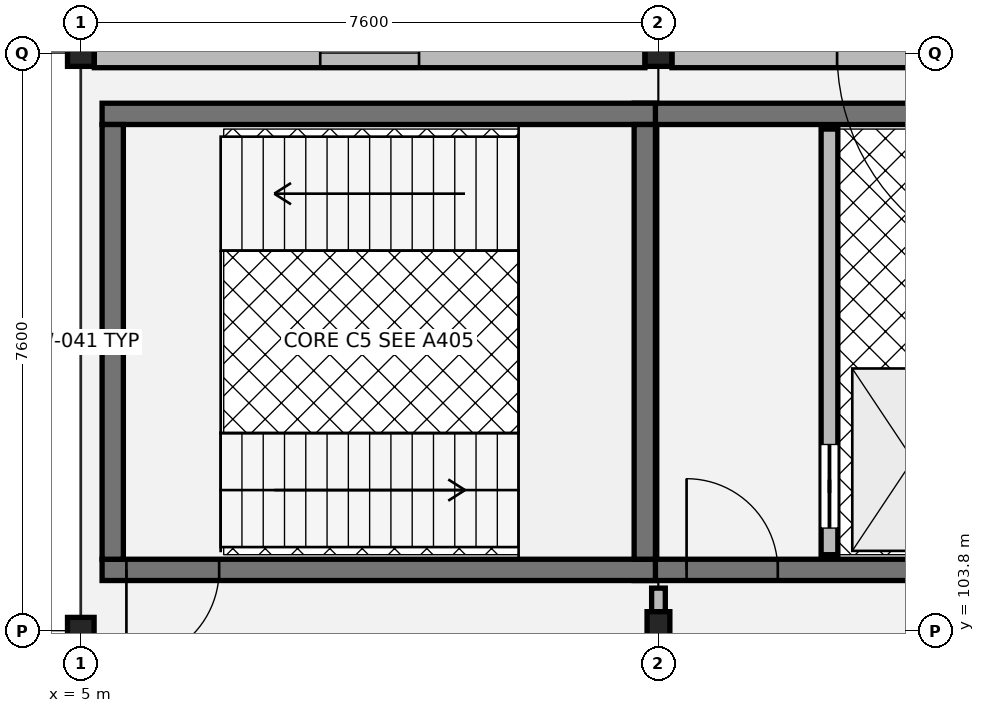
"""IFC4 building model, lengths in metres.
Left out: names, types, materials, properties, quantities, classifications, styles, units other than length and angle.
Written with IfcOpenShell. Run it as: python <this file> out.ifc"""

import sys

from ifc_helpers import new_model, si_unit, direction, frame, frame_2d, origin, origin_2d, place, context, subcontext, project, spatial, rectangle, hollow_rectangle, i_section, extrude, element, fill, save


model = new_model("IFC4")
c1 = context("Model", 3, precision=1e-05, world=origin(), true_north=direction((0.0, 1.0)))
c2 = subcontext(c1, "Body", "Model", "MODEL_VIEW")
j1 = project(units=[si_unit("LENGTHUNIT", "METRE"), si_unit("PLANEANGLEUNIT", "RADIAN")], contexts=[c1])
p1 = place(None, origin())
s1 = spatial("IfcSite", under=j1, at=p1, CompositionType="ELEMENT")
p2 = place(p1, origin())
s2 = spatial("IfcBuilding", under=s1, at=p2, CompositionType="ELEMENT")
p3 = place(p2, origin())
s3 = spatial("IfcBuildingStorey", under=s2, at=p3, CompositionType="ELEMENT", Elevation=0.0)
for number, where, z_axis, x_axis in (
    (1, (5.0, 103.8, 0.0), (0.0, 0.0, 1.0), (1.0, 0.0, 0.0)),
    (2, (5.0, 111.4, 0.0), (0.0, 0.0, 1.0), (1.0, 0.0, 0.0)),
):
    element("IfcColumn", number, at=place(p3, frame(where, z_axis=z_axis, x_axis=x_axis)), inside=s3, PredefinedType="COLUMN", context=c2, shape_type="SweptSolid", body=[
        extrude(hollow_rectangle(XDim=0.35, YDim=0.35, WallThickness=0.014, at=origin_2d()), origin(), (0.0, 0.0, 1.0), 5.075),
    ])
p4 = place(p3, frame((12.6, 103.8, 0.0), z_axis=(0.0, 0.0, 1.0), x_axis=(1.0, 0.0, 0.0)))
e3 = element("IfcColumn", 3, at=p4, inside=s3, PredefinedType="COLUMN", context=c2, shape_type="SweptSolid", body=[
    extrude(i_section(OverallWidth=0.3, OverallDepth=0.5, WebThickness=0.014, FlangeThickness=0.028, at=origin_2d()), origin(), (0.0, 0.0, 1.0), 5.075),
])
p5 = place(p3, frame((12.6, 111.4, 0.0), z_axis=(0.0, 0.0, 1.0), x_axis=(1.0, 0.0, 0.0)))
e4 = element("IfcColumn", 4, at=p5, inside=s3, PredefinedType="COLUMN", context=c2, shape_type="SweptSolid", body=[
    extrude(hollow_rectangle(XDim=0.35, YDim=0.35, WallThickness=0.014, at=origin_2d()), origin(), (0.0, 0.0, 1.0), 5.075),
])
p6 = place(p3, frame((20.022, 111.4, 0.0), z_axis=(0.0, 0.0, 1.0), x_axis=(-1.0, 0.0, 0.0)))
e5 = element("IfcWall", 5, at=p6, inside=s3, PredefinedType="SOLIDWALL", context=c2, shape_type="SweptSolid", body=[
    extrude(rectangle(XDim=7.244, YDim=0.385, at=frame_2d((3.622, 0.0))), origin(), (0.0, 0.0, 1.0), 4.5),
])
p7 = place(p6, frame((2.172, 0.0, 0.0)))
e6 = element("IfcOpeningElement", 6, at=p7, cuts=e5, PredefinedType="OPENING", context=c2, shape_type="SweptSolid", body=[
    extrude(rectangle(XDim=2.9, YDim=2.95, at=frame_2d((1.45, 1.475))), frame((0.0, 0.202, 0.0), z_axis=(0.0, -1.0, 0.0), x_axis=(1.0, 0.0, 0.0)), (0.0, 0.0, 1.0), 0.405),
])
p8 = place(p3, frame((12.422, 111.4, 0.0), z_axis=(0.0, 0.0, 1.0), x_axis=(-1.0, 0.0, 0.0)))
e7 = element("IfcWall", 7, at=p8, inside=s3, PredefinedType="SOLIDWALL", context=c2, shape_type="SweptSolid", body=[
    extrude(rectangle(XDim=7.244, YDim=0.385, at=frame_2d((3.622, 0.0))), origin(), (0.0, 0.0, 1.0), 4.5),
])
p9 = place(p8, frame((2.972, 0.0, 0.8)))
e8 = element("IfcOpeningElement", 8, at=p9, cuts=e7, PredefinedType="OPENING", context=c2, shape_type="SweptSolid", body=[
    extrude(rectangle(XDim=1.3, YDim=2.12, at=frame_2d((0.65, 1.06))), frame((0.0, 0.202, 0.0), z_axis=(0.0, -1.0, 0.0), x_axis=(1.0, 0.0, 0.0)), (0.0, 0.0, 1.0), 0.405),
])
p10 = place(p3, frame((12.28, 104.6, 0.0), z_axis=(0.0, 0.0, 1.0), x_axis=(1.0, 0.0, 0.0)))
e9 = element("IfcWall", 9, at=p10, inside=s3, PredefinedType="SHEAR", context=c2, shape_type="SweptSolid", body=[
    extrude(rectangle(XDim=4.96, YDim=0.28, at=frame_2d((2.48, 0.0))), origin(), (0.0, 0.0, 1.0), 4.865),
])
p11 = place(p10, frame((0.69, 0.0, 0.0)))
e10 = element("IfcOpeningElement", 10, at=p11, cuts=e9, PredefinedType="OPENING", context=c2, shape_type="SweptSolid", body=[
    extrude(rectangle(XDim=1.2, YDim=2.16, at=frame_2d((0.6, 1.08))), frame((0.0, 0.15, 0.0), z_axis=(0.0, -1.0, 0.0), x_axis=(1.0, 0.0, 0.0)), (0.0, 0.0, 1.0), 0.3),
])
p12 = place(p3, frame((17.24, 110.6, 0.0), z_axis=(0.0, 0.0, 1.0), x_axis=(-1.0, 0.0, 0.0)))
e11 = element("IfcWall", 11, at=p12, inside=s3, PredefinedType="SHEAR", context=c2, shape_type="SweptSolid", body=[
    extrude(rectangle(XDim=4.96, YDim=0.28, at=frame_2d((2.48, 0.0))), origin(), (0.0, 0.0, 1.0), 4.865),
])
p13 = place(p3, frame((14.85, 104.8, 0.0), z_axis=(0.0, 0.0, 1.0), x_axis=(0.0, 1.0, 0.0)))
e12 = element("IfcWall", 12, at=p13, inside=s3, PredefinedType="SOLIDWALL", context=c2, shape_type="SweptSolid", body=[
    extrude(rectangle(XDim=5.6, YDim=0.22, at=frame_2d((2.8, 0.0))), origin(), (0.0, 0.0, 1.0), 4.865),
])
p14 = place(p13, frame((0.35, 0.0, 0.0)))
e13 = element("IfcOpeningElement", 13, at=p14, cuts=e12, PredefinedType="OPENING", context=c2, shape_type="SweptSolid", body=[
    extrude(rectangle(XDim=1.1, YDim=2.15, at=frame_2d((0.55, 1.075))), frame((0.0, 0.12, 0.0), z_axis=(0.0, -1.0, 0.0), x_axis=(1.0, 0.0, 0.0)), (0.0, 0.0, 1.0), 0.24),
])
p15 = place(p3, frame((5.28, 104.6, 0.0), z_axis=(0.0, 0.0, 1.0), x_axis=(1.0, 0.0, 0.0)))
e14 = element("IfcWall", 14, at=p15, inside=s3, PredefinedType="SHEAR", context=c2, shape_type="SweptSolid", body=[
    extrude(rectangle(XDim=7.28, YDim=0.28, at=frame_2d((3.64, 0.0))), origin(), (0.0, 0.0, 1.0), 4.865),
])
p16 = place(p15, frame((0.32, 0.0, 0.0)))
e15 = element("IfcOpeningElement", 15, at=p16, cuts=e14, PredefinedType="OPENING", context=c2, shape_type="SweptSolid", body=[
    extrude(rectangle(XDim=1.22, YDim=2.18, at=frame_2d((0.61, 1.09))), frame((0.0, 0.15, 0.0), z_axis=(0.0, -1.0, 0.0), x_axis=(1.0, 0.0, 0.0)), (0.0, 0.0, 1.0), 0.3),
])
p17 = place(p3, frame((5.28, 110.6, 0.0), z_axis=(0.0, 0.0, 1.0), x_axis=(1.0, 0.0, 0.0)))
e16 = element("IfcWall", 16, at=p17, inside=s3, PredefinedType="SHEAR", context=c2, shape_type="SweptSolid", body=[
    extrude(rectangle(XDim=7.28, YDim=0.28, at=frame_2d((3.64, 0.0))), origin(), (0.0, 0.0, 1.0), 4.865),
])
for number, where, z_axis, x_axis in (
    (17, (5.42, 104.74, 0.0), (0.0, 0.0, 1.0), (0.0, 1.0, 0.0)),
    (18, (12.42, 104.74, 0.0), (0.0, 0.0, 1.0), (0.0, 1.0, 0.0)),
):
    element("IfcWall", number, at=place(p3, frame(where, z_axis=z_axis, x_axis=x_axis)), inside=s3, PredefinedType="SHEAR", context=c2, shape_type="SweptSolid", body=[
        extrude(rectangle(XDim=5.72, YDim=0.28, at=frame_2d((2.86, 0.0))), origin(), (0.0, 0.0, 1.0), 4.865),
    ])
p18 = place(p3, frame((12.6, 104.04, 0.0), z_axis=(0.0, 0.0, 1.0), x_axis=(0.0, 1.0, 0.0)))
e19 = element("IfcWall", 19, at=p18, inside=s3, PredefinedType="PARTITIONING", context=c2, shape_type="SweptSolid", body=[
    extrude(rectangle(XDim=0.32, YDim=0.18, at=frame_2d((0.16, 0.0))), origin(), (0.0, 0.0, 1.0), 4.2),
])
p19 = place(p7, origin())
e20 = element("IfcDoor", 20, at=p19, inside=s3, OperationType="DOUBLE_DOOR_SINGLE_SWING", PredefinedType="GATE", context=c2, shape_type="SweptSolid", body=[
    extrude(rectangle(XDim=2.9, YDim=2.95, at=frame_2d((1.45, 1.475))), frame((0.0, 0.025, 0.0), z_axis=(0.0, -1.0, 0.0), x_axis=(1.0, 0.0, 0.0)), (0.0, 0.0, 1.0), 0.05),
])
fill(e6, e20)
p20 = place(p9, origin())
e21 = element("IfcWindow", 21, at=p20, inside=s3, PartitioningType="SINGLE_PANEL", PredefinedType="WINDOW", context=c2, shape_type="SweptSolid", body=[
    extrude(rectangle(XDim=1.3, YDim=2.12, at=frame_2d((0.65, 1.06))), frame((0.0, 0.03, 0.0), z_axis=(0.0, -1.0, 0.0), x_axis=(1.0, 0.0, 0.0)), (0.0, 0.0, 1.0), 0.06),
])
fill(e8, e21)
p21 = place(p11, origin())
e22 = element("IfcDoor", 22, at=p21, inside=s3, OperationType="SINGLE_SWING_LEFT", PredefinedType="DOOR", context=c2, shape_type="SweptSolid", body=[
    extrude(rectangle(XDim=1.2, YDim=2.16, at=frame_2d((0.6, 1.08))), frame((0.0, 0.025, 0.0), z_axis=(0.0, -1.0, 0.0), x_axis=(1.0, 0.0, 0.0)), (0.0, 0.0, 1.0), 0.05),
])
fill(e10, e22)
p22 = place(p14, origin())
e23 = element("IfcDoor", 23, at=p22, inside=s3, OperationType="SLIDING_TO_LEFT", PredefinedType="DOOR", context=c2, shape_type="SweptSolid", body=[
    extrude(rectangle(XDim=1.1, YDim=2.15, at=frame_2d((0.55, 1.075))), frame((0.0, 0.025, 0.0), z_axis=(0.0, -1.0, 0.0), x_axis=(1.0, 0.0, 0.0)), (0.0, 0.0, 1.0), 0.05),
])
fill(e13, e23)
p23 = place(p16, origin())
e24 = element("IfcDoor", 24, at=p23, inside=s3, OperationType="SINGLE_SWING_RIGHT", PredefinedType="DOOR", context=c2, shape_type="SweptSolid", body=[
    extrude(rectangle(XDim=1.22, YDim=2.18, at=frame_2d((0.61, 1.09))), frame((0.0, 0.025, 0.0), z_axis=(0.0, -1.0, 0.0), x_axis=(1.0, 0.0, 0.0)), (0.0, 0.0, 1.0), 0.05),
])
fill(e15, e24)
save(model, sys.argv[1])
